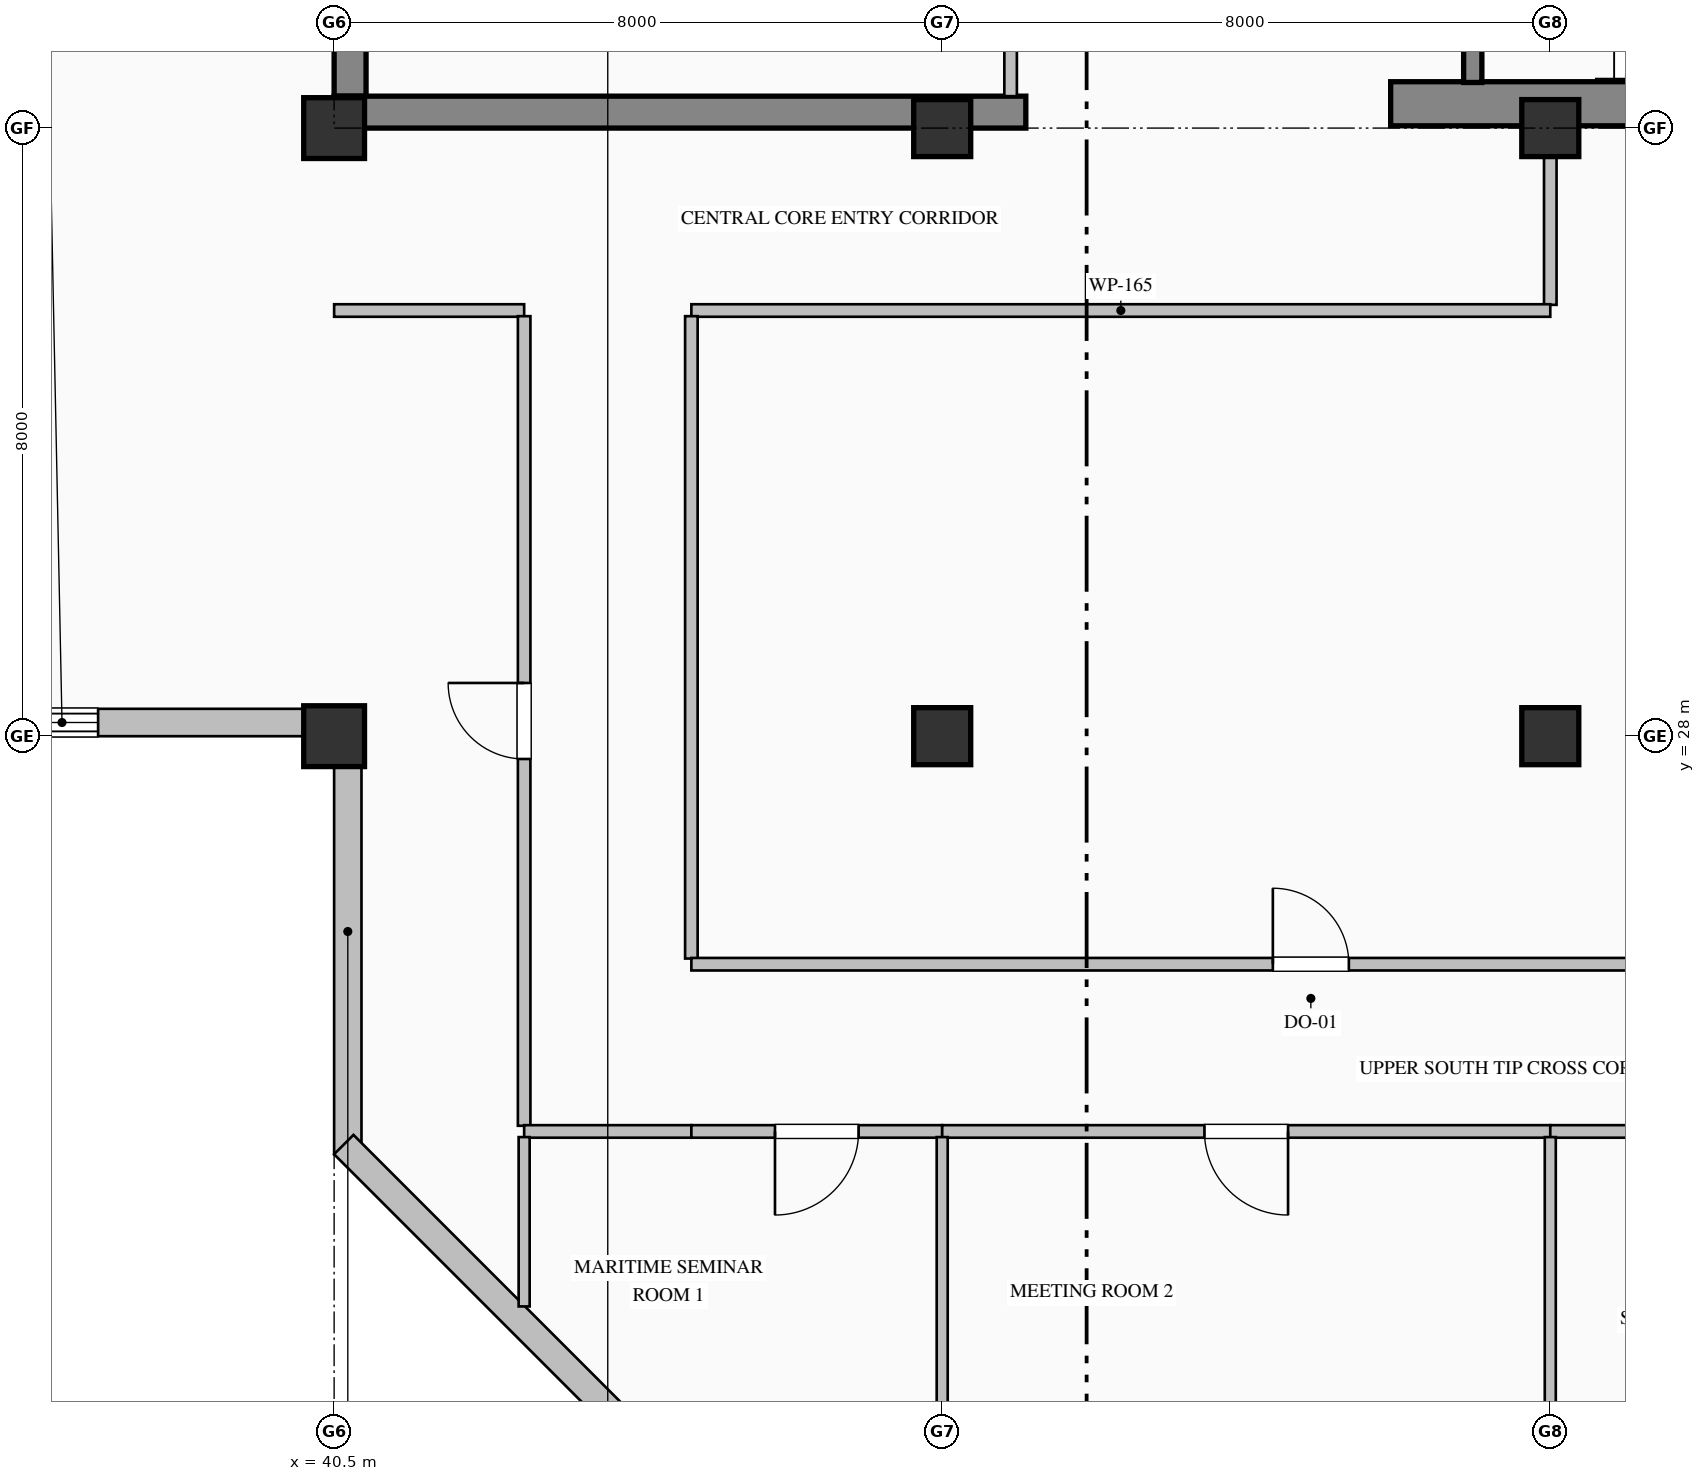
"""IFC4 building model, lengths in metres.
Left out: names, types, materials, properties, quantities, classifications, styles, units other than length and angle.
Written with IfcOpenShell. Run it as: python <this file> out.ifc"""

import sys

from ifc_helpers import new_model, si_unit, direction, frame, frame_2d, origin, origin_2d, place, context, subcontext, project, spatial, rectangle, hollow_rectangle, extrude, element, fill, save


model = new_model("IFC4")
c1 = context("Model", 3, precision=1e-05, world=origin(), true_north=direction((0.0, 1.0)))
c2 = subcontext(c1, "Body", "Model", "MODEL_VIEW")
j1 = project(units=[si_unit("LENGTHUNIT", "METRE"), si_unit("PLANEANGLEUNIT", "RADIAN")], contexts=[c1])
p1 = place(None, origin())
s1 = spatial("IfcSite", under=j1, at=p1, CompositionType="ELEMENT")
p2 = place(p1, origin())
s2 = spatial("IfcBuilding", under=s1, at=p2, CompositionType="ELEMENT")
p3 = place(p2, frame((0.0, 0.0, 307.2)))
s3 = spatial("IfcBuildingStorey", under=s2, at=p3, CompositionType="ELEMENT", Elevation=307.2)
p4 = place(p3, frame((40.71, 36.42, 0.0), z_axis=(0.0, 0.0, 1.0), x_axis=(0.0, 1.0, 0.0)))
e1 = element("IfcWall", 1, at=p4, inside=s3, PredefinedType="SHEAR", context=c2, shape_type="SweptSolid", body=[
    extrude(rectangle(XDim=7.98, YDim=0.42, at=frame_2d((3.99, 0.0))), origin(), (0.0, 0.0, 1.0), 3.785),
])
p5 = place(p3, frame((40.5, 36.21, 0.0), z_axis=(0.0, 0.0, 1.0), x_axis=(1.0, 0.0, 0.0)))
e2 = element("IfcWall", 2, at=p5, inside=s3, PredefinedType="SHEAR", context=c2, shape_type="SweptSolid", body=[
    extrude(rectangle(XDim=9.1, YDim=0.42, at=frame_2d((4.55, 0.0))), origin(), (0.0, 0.0, 1.0), 3.785),
])
p6 = place(p3, frame((54.4, 36.32, 0.0), z_axis=(0.0, 0.0, 1.0), x_axis=(1.0, 0.0, 0.0)))
e3 = element("IfcWall", 3, at=p6, inside=s3, PredefinedType="SHEAR", context=c2, shape_type="SweptSolid", body=[
    extrude(rectangle(XDim=9.6, YDim=0.58, at=frame_2d((4.8, 0.0))), origin(), (0.0, 0.0, 1.0), 4.0),
])
for number, where, z_axis, x_axis in (
    (4, (40.5, 28.0, 0.0), (0.0, 0.0, 1.0), (1.0, 0.0, 0.0)),
    (5, (40.5, 36.0, 0.0), (0.0, 0.0, 1.0), (1.0, 0.0, 0.0)),
):
    element("IfcColumn", number, at=place(p3, frame(where, z_axis=z_axis, x_axis=x_axis)), inside=s3, PredefinedType="COLUMN", context=c2, shape_type="SweptSolid", body=[
        extrude(hollow_rectangle(XDim=0.8, YDim=0.8, WallThickness=0.032, at=origin_2d()), origin(), (0.0, 0.0, 1.0), 4.0),
    ])
for number, where, z_axis, x_axis in (
    (6, (48.5, 28.0, 0.0), (0.0, 0.0, 1.0), (1.0, 0.0, 0.0)),
    (7, (48.5, 36.0, 0.0), (0.0, 0.0, 1.0), (1.0, 0.0, 0.0)),
    (8, (56.5, 28.0, 0.0), (0.0, 0.0, 1.0), (1.0, 0.0, 0.0)),
    (9, (56.5, 36.0, 0.0), (0.0, 0.0, 1.0), (1.0, 0.0, 0.0)),
):
    element("IfcColumn", number, at=place(p3, frame(where, z_axis=z_axis, x_axis=x_axis)), inside=s3, PredefinedType="COLUMN", context=c2, shape_type="SweptSolid", body=[
        extrude(rectangle(XDim=0.75, YDim=0.75, at=origin_2d()), origin(), (0.0, 0.0, 1.0), 4.0),
    ])
p7 = place(p3, frame((40.68, 22.5, 0.0), z_axis=(0.0, 0.0, 1.0), x_axis=(0.0, 1.0, 0.0)))
e10 = element("IfcWall", 10, at=p7, inside=s3, PredefinedType="SOLIDWALL", context=c2, shape_type="SweptSolid", body=[
    extrude(rectangle(XDim=5.86, YDim=0.36, at=frame_2d((2.93, 0.0))), origin(), (0.0, 0.0, 1.0), 3.185),
])
p8 = place(p3, frame((40.52, 28.18, 0.0), z_axis=(0.0, 0.0, 1.0), x_axis=(-1.0, 0.0, 0.0)))
e11 = element("IfcWall", 11, at=p8, inside=s3, PredefinedType="SOLIDWALL", context=c2, shape_type="SweptSolid", body=[
    extrude(rectangle(XDim=20.02, YDim=0.36, at=frame_2d((10.01, 0.0))), origin(), (0.0, 0.0, 1.0), 3.185),
])
p9 = place(p8, frame((3.125, 0.0, 0.9)))
e12 = element("IfcOpeningElement", 12, at=p9, cuts=e11, PredefinedType="OPENING", context=c2, shape_type="SweptSolid", body=[
    extrude(rectangle(XDim=0.95, YDim=1.85, at=frame_2d((0.475, 0.925))), frame((0.0, 0.19, 0.0), z_axis=(0.0, -1.0, 0.0), x_axis=(1.0, 0.0, 0.0)), (0.0, 0.0, 1.0), 0.38),
])
p10 = place(p8, frame((10.125, 0.0, 0.9)))
e13 = element("IfcOpeningElement", 13, at=p10, cuts=e11, PredefinedType="OPENING", context=c2, shape_type="SweptSolid", body=[
    extrude(rectangle(XDim=1.35, YDim=1.85, at=frame_2d((0.675, 0.925))), frame((0.0, 0.19, 0.0), z_axis=(0.0, -1.0, 0.0), x_axis=(1.0, 0.0, 0.0)), (0.0, 0.0, 1.0), 0.38),
])
p11 = place(p8, frame((13.925, 0.0, 0.9)))
e14 = element("IfcOpeningElement", 14, at=p11, cuts=e11, PredefinedType="OPENING", context=c2, shape_type="SweptSolid", body=[
    extrude(rectangle(XDim=0.95, YDim=1.85, at=frame_2d((0.475, 0.925))), frame((0.0, 0.19, 0.0), z_axis=(0.0, -1.0, 0.0), x_axis=(1.0, 0.0, 0.0)), (0.0, 0.0, 1.0), 0.38),
])
p12 = place(p3, frame((44.627, 18.627, 0.0), z_axis=(0.0, 0.0, 1.0), x_axis=(-0.707106781187, 0.707106781187, 0.0)))
e15 = element("IfcWall", 15, at=p12, inside=s3, PredefinedType="SOLIDWALL", context=c2, shape_type="SweptSolid", body=[
    extrude(rectangle(XDim=5.657, YDim=0.36, at=frame_2d((2.828, 0.0))), origin(), (0.0, 0.0, 1.0), 3.785),
])
p13 = place(p3, frame((55.48, 39.75, 0.0), z_axis=(0.0, 0.0, 1.0), x_axis=(0.0, -1.0, 0.0)))
e16 = element("IfcWall", 16, at=p13, inside=s3, PredefinedType="SOLIDWALL", context=c2, shape_type="SweptSolid", body=[
    extrude(rectangle(XDim=3.15, YDim=0.24, at=frame_2d((1.575, 0.0))), origin(), (0.0, 0.0, 1.0), 4.0),
])
p14 = place(p13, frame((1.0, 0.0, 0.0)))
e17 = element("IfcOpeningElement", 17, at=p14, cuts=e16, PredefinedType="OPENING", context=c2, shape_type="SweptSolid", body=[
    extrude(rectangle(XDim=1.15, YDim=2.2, at=frame_2d((0.575, 1.1))), frame((0.0, 0.13, 0.0), z_axis=(0.0, -1.0, 0.0), x_axis=(1.0, 0.0, 0.0)), (0.0, 0.0, 1.0), 0.26),
])
p15 = place(p3, frame((49.4, 36.42, 0.0), z_axis=(0.0, 0.0, 1.0), x_axis=(0.0, 1.0, 0.0)))
e18 = element("IfcWall", 18, at=p15, inside=s3, PredefinedType="PARTITIONING", context=c2, shape_type="SweptSolid", body=[
    extrude(rectangle(XDim=3.115, YDim=0.165, at=frame_2d((1.558, 0.0))), origin(), (0.0, 0.0, 1.0), 3.027),
])
p16 = place(p15, frame((1.058, 0.0, 0.0)))
e19 = element("IfcOpeningElement", 19, at=p16, cuts=e18, PredefinedType="OPENING", context=c2, shape_type="SweptSolid", body=[
    extrude(rectangle(XDim=1.0, YDim=2.15, at=frame_2d((0.5, 1.075))), frame((0.0, 0.093, 0.0), z_axis=(0.0, -1.0, 0.0), x_axis=(1.0, 0.0, 0.0)), (0.0, 0.0, 1.0), 0.185),
])
p17 = place(p3, frame((56.5, 36.0, 0.0), z_axis=(0.0, 0.0, 1.0), x_axis=(0.0, -1.0, 0.0)))
e20 = element("IfcWall", 20, at=p17, inside=s3, PredefinedType="PARTITIONING", context=c2, shape_type="SweptSolid", body=[
    extrude(rectangle(XDim=2.325, YDim=0.165, at=frame_2d((1.163, 0.0))), origin(), (0.0, 0.0, 1.0), 3.177),
])
p18 = place(p3, frame((56.5, 33.6, 0.0), z_axis=(0.0, 0.0, 1.0), x_axis=(-1.0, 0.0, 0.0)))
e21 = element("IfcWall", 21, at=p18, inside=s3, PredefinedType="PARTITIONING", context=c2, shape_type="SweptSolid", body=[
    extrude(rectangle(XDim=11.3, YDim=0.165, at=frame_2d((5.65, 0.0))), origin(), (0.0, 0.0, 1.0), 3.785),
])
p19 = place(p3, frame((43.0, 33.6, 0.0), z_axis=(0.0, 0.0, 1.0), x_axis=(-1.0, 0.0, 0.0)))
e22 = element("IfcWall", 22, at=p19, inside=s3, PredefinedType="PARTITIONING", context=c2, shape_type="SweptSolid", body=[
    extrude(rectangle(XDim=2.5, YDim=0.165, at=frame_2d((1.25, 0.0))), origin(), (0.0, 0.0, 1.0), 3.785),
])
p20 = place(p3, frame((45.2, 33.525, 0.0), z_axis=(0.0, 0.0, 1.0), x_axis=(0.0, -1.0, 0.0)))
e23 = element("IfcWall", 23, at=p20, inside=s3, PredefinedType="PARTITIONING", context=c2, shape_type="SweptSolid", body=[
    extrude(rectangle(XDim=8.451, YDim=0.165, at=frame_2d((4.226, 0.0))), origin(), (0.0, 0.0, 1.0), 3.785),
])
p21 = place(p3, frame((43.0, 22.875, 0.0), z_axis=(0.0, 0.0, 1.0), x_axis=(0.0, 1.0, 0.0)))
e24 = element("IfcWall", 24, at=p21, inside=s3, PredefinedType="PARTITIONING", context=c2, shape_type="SweptSolid", body=[
    extrude(rectangle(XDim=10.651, YDim=0.165, at=frame_2d((5.325, 0.0))), origin(), (0.0, 0.0, 1.0), 3.785),
])
p22 = place(p21, frame((4.825, 0.0, 0.0)))
e25 = element("IfcOpeningElement", 25, at=p22, cuts=e24, PredefinedType="OPENING", context=c2, shape_type="SweptSolid", body=[
    extrude(rectangle(XDim=1.0, YDim=2.15, at=frame_2d((0.5, 1.075))), frame((0.0, 0.093, 0.0), z_axis=(0.0, -1.0, 0.0), x_axis=(1.0, 0.0, 0.0)), (0.0, 0.0, 1.0), 0.185),
])
p23 = place(p3, frame((45.2, 22.8, 0.0), z_axis=(0.0, 0.0, 1.0), x_axis=(-1.0, 0.0, 0.0)))
e26 = element("IfcWall", 26, at=p23, inside=s3, PredefinedType="PARTITIONING", context=c2, shape_type="SweptSolid", body=[
    extrude(rectangle(XDim=2.2, YDim=0.165, at=frame_2d((1.1, 0.0))), origin(), (0.0, 0.0, 1.0), 3.785),
])
p24 = place(p3, frame((45.2, 25.0, 0.0), z_axis=(0.0, 0.0, 1.0), x_axis=(1.0, 0.0, 0.0)))
e27 = element("IfcWall", 27, at=p24, inside=s3, PredefinedType="PARTITIONING", context=c2, shape_type="SweptSolid", body=[
    extrude(rectangle(XDim=16.3, YDim=0.165, at=frame_2d((8.15, 0.0))), origin(), (0.0, 0.0, 1.0), 3.785),
])
p25 = place(p24, frame((7.65, 0.0, 0.0)))
e28 = element("IfcOpeningElement", 28, at=p25, cuts=e27, PredefinedType="OPENING", context=c2, shape_type="SweptSolid", body=[
    extrude(rectangle(XDim=1.0, YDim=2.15, at=frame_2d((0.5, 1.075))), frame((0.0, 0.093, 0.0), z_axis=(0.0, -1.0, 0.0), x_axis=(1.0, 0.0, 0.0)), (0.0, 0.0, 1.0), 0.185),
])
p26 = place(p3, frame((48.5, 22.8, 0.0), z_axis=(0.0, 0.0, 1.0), x_axis=(-1.0, 0.0, 0.0)))
e29 = element("IfcWall", 29, at=p26, inside=s3, PredefinedType="PARTITIONING", context=c2, shape_type="SweptSolid", body=[
    extrude(rectangle(XDim=3.3, YDim=0.165, at=frame_2d((1.65, 0.0))), origin(), (0.0, 0.0, 1.0), 3.785),
])
p27 = place(p26, frame((1.1, 0.0, 0.0)))
e30 = element("IfcOpeningElement", 30, at=p27, cuts=e29, PredefinedType="OPENING", context=c2, shape_type="SweptSolid", body=[
    extrude(rectangle(XDim=1.1, YDim=2.2, at=frame_2d((0.55, 1.1))), frame((0.0, 0.093, 0.0), z_axis=(0.0, -1.0, 0.0), x_axis=(1.0, 0.0, 0.0)), (0.0, 0.0, 1.0), 0.185),
])
p28 = place(p3, frame((56.5, 22.8, 0.0), z_axis=(0.0, 0.0, 1.0), x_axis=(-1.0, 0.0, 0.0)))
e31 = element("IfcWall", 31, at=p28, inside=s3, PredefinedType="PARTITIONING", context=c2, shape_type="SweptSolid", body=[
    extrude(rectangle(XDim=8.0, YDim=0.165, at=frame_2d((4.0, 0.0))), origin(), (0.0, 0.0, 1.0), 3.785),
])
p29 = place(p28, frame((3.45, 0.0, 0.0)))
e32 = element("IfcOpeningElement", 32, at=p29, cuts=e31, PredefinedType="OPENING", context=c2, shape_type="SweptSolid", body=[
    extrude(rectangle(XDim=1.1, YDim=2.2, at=frame_2d((0.55, 1.1))), frame((0.0, 0.093, 0.0), z_axis=(0.0, -1.0, 0.0), x_axis=(1.0, 0.0, 0.0)), (0.0, 0.0, 1.0), 0.185),
])
p30 = place(p3, frame((61.5, 22.8, 0.0), z_axis=(0.0, 0.0, 1.0), x_axis=(-1.0, 0.0, 0.0)))
e33 = element("IfcWall", 33, at=p30, inside=s3, PredefinedType="PARTITIONING", context=c2, shape_type="SweptSolid", body=[
    extrude(rectangle(XDim=5.0, YDim=0.165, at=frame_2d((2.5, 0.0))), origin(), (0.0, 0.0, 1.0), 3.785),
])
p31 = place(p30, frame((2.0, 0.0, 0.0)))
e34 = element("IfcOpeningElement", 34, at=p31, cuts=e33, PredefinedType="OPENING", context=c2, shape_type="SweptSolid", body=[
    extrude(rectangle(XDim=1.0, YDim=2.15, at=frame_2d((0.5, 1.075))), frame((0.0, 0.093, 0.0), z_axis=(0.0, -1.0, 0.0), x_axis=(1.0, 0.0, 0.0)), (0.0, 0.0, 1.0), 0.185),
])
p32 = place(p3, frame((43.0, 22.726, 0.0), z_axis=(0.0, 0.0, 1.0), x_axis=(0.0, -1.0, 0.0)))
e35 = element("IfcWall", 35, at=p32, inside=s3, PredefinedType="PARTITIONING", context=c2, shape_type="SweptSolid", body=[
    extrude(rectangle(XDim=2.228, YDim=0.145, at=frame_2d((1.114, 0.0))), origin(), (0.0, 0.0, 1.0), 3.785),
])
for number, where, z_axis, x_axis in (
    (36, (48.5, 22.726, 0.0), (0.0, 0.0, 1.0), (0.0, -1.0, 0.0)),
    (37, (56.5, 22.726, 0.0), (0.0, 0.0, 1.0), (0.0, -1.0, 0.0)),
):
    element("IfcWall", number, at=place(p3, frame(where, z_axis=z_axis, x_axis=x_axis)), inside=s3, PredefinedType="PARTITIONING", context=c2, shape_type="SweptSolid", body=[
        extrude(rectangle(XDim=3.874, YDim=0.145, at=frame_2d((1.937, 0.0))), origin(), (0.0, 0.0, 1.0), 2.977),
    ])
p33 = place(p9, origin())
e38 = element("IfcWindow", 38, at=p33, inside=s3, PartitioningType="SINGLE_PANEL", PredefinedType="WINDOW", context=c2, shape_type="SweptSolid", body=[
    extrude(rectangle(XDim=0.95, YDim=1.85, at=frame_2d((0.475, 0.925))), frame((0.0, 0.15, 0.0), z_axis=(0.0, -1.0, 0.0), x_axis=(1.0, 0.0, 0.0)), (0.0, 0.0, 1.0), 0.06),
])
fill(e12, e38)
p34 = place(p25, origin())
e39 = element("IfcDoor", 39, at=p34, inside=s3, OperationType="SINGLE_SWING_LEFT", PredefinedType="DOOR", context=c2, shape_type="SweptSolid", body=[
    extrude(rectangle(XDim=1.0, YDim=2.15, at=frame_2d((0.5, 1.075))), frame((0.0, 0.025, 0.0), z_axis=(0.0, -1.0, 0.0), x_axis=(1.0, 0.0, 0.0)), (0.0, 0.0, 1.0), 0.05),
])
fill(e28, e39)
p35 = place(p22, origin())
e40 = element("IfcDoor", 40, at=p35, inside=s3, OperationType="SINGLE_SWING_RIGHT", PredefinedType="DOOR", context=c2, shape_type="SweptSolid", body=[
    extrude(rectangle(XDim=1.0, YDim=2.15, at=frame_2d((0.5, 1.075))), frame((0.0, 0.025, 0.0), z_axis=(0.0, -1.0, 0.0), x_axis=(1.0, 0.0, 0.0)), (0.0, 0.0, 1.0), 0.05),
])
fill(e25, e40)
p36 = place(p27, origin())
e41 = element("IfcDoor", 41, at=p36, inside=s3, OperationType="SINGLE_SWING_RIGHT", PredefinedType="DOOR", context=c2, shape_type="SweptSolid", body=[
    extrude(rectangle(XDim=1.1, YDim=2.2, at=frame_2d((0.55, 1.1))), frame((0.0, 0.025, 0.0), z_axis=(0.0, -1.0, 0.0), x_axis=(1.0, 0.0, 0.0)), (0.0, 0.0, 1.0), 0.05),
])
fill(e30, e41)
p37 = place(p29, origin())
e42 = element("IfcDoor", 42, at=p37, inside=s3, OperationType="SINGLE_SWING_LEFT", PredefinedType="DOOR", context=c2, shape_type="SweptSolid", body=[
    extrude(rectangle(XDim=1.1, YDim=2.2, at=frame_2d((0.55, 1.1))), frame((0.0, 0.025, 0.0), z_axis=(0.0, -1.0, 0.0), x_axis=(1.0, 0.0, 0.0)), (0.0, 0.0, 1.0), 0.05),
])
fill(e32, e42)
save(model, sys.argv[1])
